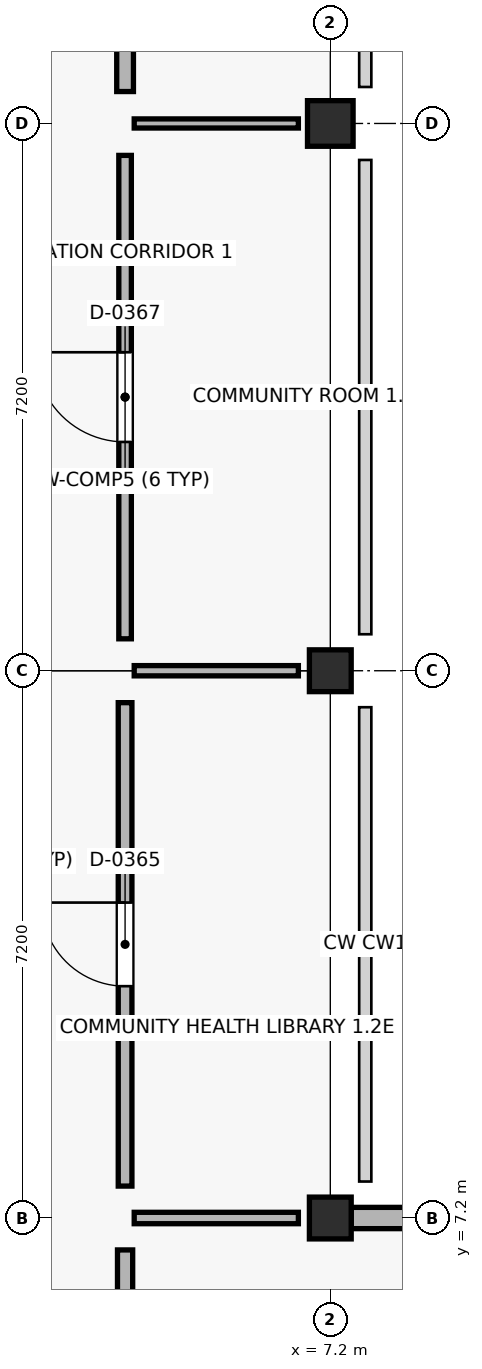
"""IFC4 building model, lengths in metres.
Left out: names, types, materials, properties, quantities, classifications, styles, units other than length and angle.
Written with IfcOpenShell. Run it as: python <this file> out.ifc"""

import sys

from ifc_helpers import new_model, si_unit, direction, frame, frame_2d, origin, origin_2d, place, context, subcontext, project, spatial, rectangle, extrude, element, fill, save


model = new_model("IFC4")
c1 = context("Model", 3, precision=1e-05, world=origin(), true_north=direction((0.0, 1.0)))
c2 = subcontext(c1, "Body", "Model", "MODEL_VIEW")
j1 = project(units=[si_unit("LENGTHUNIT", "METRE"), si_unit("PLANEANGLEUNIT", "RADIAN")], contexts=[c1])
p1 = place(None, origin())
s1 = spatial("IfcSite", under=j1, at=p1, CompositionType="ELEMENT")
p2 = place(p1, origin())
s2 = spatial("IfcBuilding", under=s1, at=p2, CompositionType="ELEMENT")
p3 = place(p2, frame((0.0, 0.0, 4.5)))
s3 = spatial("IfcBuildingStorey", under=s2, at=p3, CompositionType="ELEMENT", Elevation=4.5)
for number, where, z_axis, x_axis in (
    (1, (7.2, 7.2, 0.0), (0.0, 0.0, 1.0), (1.0, 0.0, 0.0)),
    (2, (7.2, 14.4, 0.0), (0.0, 0.0, 1.0), (1.0, 0.0, 0.0)),
):
    element("IfcColumn", number, at=place(p3, frame(where, z_axis=z_axis, x_axis=x_axis)), inside=s3, PredefinedType="COLUMN", context=c2, shape_type="SweptSolid", body=[
        extrude(rectangle(XDim=0.55, YDim=0.55, at=origin_2d()), origin(), (0.0, 0.0, 1.0), 4.5),
    ])
p4 = place(p3, frame((7.2, 21.6, 0.0), z_axis=(0.0, 0.0, 1.0), x_axis=(1.0, 0.0, 0.0)))
e3 = element("IfcColumn", 3, at=p4, inside=s3, PredefinedType="COLUMN", context=c2, shape_type="SweptSolid", body=[
    extrude(rectangle(XDim=0.6, YDim=0.6, at=origin_2d()), origin(), (0.0, 0.0, 1.0), 4.5),
])
p5 = place(p3, frame((14.175, 7.2, 0.0), z_axis=(0.0, 0.0, 1.0), x_axis=(-1.0, 0.0, 0.0)))
e4 = element("IfcWall", 4, at=p5, inside=s3, PredefinedType="STANDARD", context=c2, shape_type="SweptSolid", body=[
    extrude(rectangle(XDim=6.7, YDim=0.28, at=frame_2d((3.35, 0.0))), origin(), (0.0, 0.0, 1.0), 3.47),
])
p6 = place(p5, frame((0.775, 0.0, 0.9)))
e5 = element("IfcOpeningElement", 5, at=p6, cuts=e4, PredefinedType="OPENING", context=c2, shape_type="SweptSolid", body=[
    extrude(rectangle(XDim=1.95, YDim=1.38, at=frame_2d((0.975, 0.69))), frame((0.0, 0.15, 0.0), z_axis=(0.0, -1.0, 0.0), x_axis=(1.0, 0.0, 0.0)), (0.0, 0.0, 1.0), 0.3),
])
p7 = place(p5, frame((3.975, 0.0, 0.9)))
e6 = element("IfcOpeningElement", 6, at=p7, cuts=e4, PredefinedType="OPENING", context=c2, shape_type="SweptSolid", body=[
    extrude(rectangle(XDim=1.95, YDim=1.38, at=frame_2d((0.975, 0.69))), frame((0.0, 0.15, 0.0), z_axis=(0.0, -1.0, 0.0), x_axis=(1.0, 0.0, 0.0)), (0.0, 0.0, 1.0), 0.3),
])
p8 = place(p3, frame((4.5, 0.42, 0.0), z_axis=(0.0, 0.0, 1.0), x_axis=(0.0, 1.0, 0.0)))
e7 = element("IfcWall", 7, at=p8, inside=s3, PredefinedType="SOLIDWALL", context=c2, shape_type="SweptSolid", body=[
    extrude(rectangle(XDim=6.36, YDim=0.2, at=frame_2d((3.18, 0.0))), origin(), (0.0, 0.0, 1.0), 3.36),
])
p9 = place(p8, frame((2.67, 0.0, 0.0)))
e8 = element("IfcOpeningElement", 8, at=p9, cuts=e7, PredefinedType="OPENING", context=c2, shape_type="SweptSolid", body=[
    extrude(rectangle(XDim=1.02, YDim=2.04, at=frame_2d((0.51, 1.02))), frame((0.0, 0.11, 0.0), z_axis=(0.0, -1.0, 0.0), x_axis=(1.0, 0.0, 0.0)), (0.0, 0.0, 1.0), 0.22),
])
p10 = place(p3, frame((4.62, 7.2, 0.0), z_axis=(0.0, 0.0, 1.0), x_axis=(1.0, 0.0, 0.0)))
e9 = element("IfcWall", 9, at=p10, inside=s3, PredefinedType="PARTITIONING", context=c2, shape_type="SweptSolid", body=[
    extrude(rectangle(XDim=2.16, YDim=0.15, at=frame_2d((1.08, 0.0))), origin(), (0.0, 0.0, 1.0), 3.36),
])
p11 = place(p3, frame((4.5, 7.62, 0.0), z_axis=(0.0, 0.0, 1.0), x_axis=(0.0, 1.0, 0.0)))
e10 = element("IfcWall", 10, at=p11, inside=s3, PredefinedType="PARTITIONING", context=c2, shape_type="SweptSolid", body=[
    extrude(rectangle(XDim=6.36, YDim=0.18, at=frame_2d((3.18, 0.0))), origin(), (0.0, 0.0, 1.0), 3.36),
])
p12 = place(p11, frame((2.63, 0.0, 0.0)))
e11 = element("IfcOpeningElement", 11, at=p12, cuts=e10, PredefinedType="OPENING", context=c2, shape_type="SweptSolid", body=[
    extrude(rectangle(XDim=1.1, YDim=2.04, at=frame_2d((0.55, 1.02))), frame((0.0, 0.1, 0.0), z_axis=(0.0, -1.0, 0.0), x_axis=(1.0, 0.0, 0.0)), (0.0, 0.0, 1.0), 0.2),
])
p13 = place(p3, frame((4.62, 14.4, 0.0), z_axis=(0.0, 0.0, 1.0), x_axis=(1.0, 0.0, 0.0)))
e12 = element("IfcWall", 12, at=p13, inside=s3, PredefinedType="PARTITIONING", context=c2, shape_type="SweptSolid", body=[
    extrude(rectangle(XDim=2.16, YDim=0.135, at=frame_2d((1.08, 0.0))), origin(), (0.0, 0.0, 1.0), 3.36),
])
p14 = place(p3, frame((4.5, 14.82, 0.0), z_axis=(0.0, 0.0, 1.0), x_axis=(0.0, 1.0, 0.0)))
e13 = element("IfcWall", 13, at=p14, inside=s3, PredefinedType="PARTITIONING", context=c2, shape_type="SweptSolid", body=[
    extrude(rectangle(XDim=6.36, YDim=0.165, at=frame_2d((3.18, 0.0))), origin(), (0.0, 0.0, 1.0), 3.36),
])
p15 = place(p14, frame((2.59, 0.0, 0.0)))
e14 = element("IfcOpeningElement", 14, at=p15, cuts=e13, PredefinedType="OPENING", context=c2, shape_type="SweptSolid", body=[
    extrude(rectangle(XDim=1.18, YDim=2.04, at=frame_2d((0.59, 1.02))), frame((0.0, 0.093, 0.0), z_axis=(0.0, -1.0, 0.0), x_axis=(1.0, 0.0, 0.0)), (0.0, 0.0, 1.0), 0.185),
])
p16 = place(p3, frame((4.62, 21.6, 0.0), z_axis=(0.0, 0.0, 1.0), x_axis=(1.0, 0.0, 0.0)))
e15 = element("IfcWall", 15, at=p16, inside=s3, PredefinedType="PARTITIONING", context=c2, shape_type="SweptSolid", body=[
    extrude(rectangle(XDim=2.16, YDim=0.12, at=frame_2d((1.08, 0.0))), origin(), (0.0, 0.0, 1.0), 3.36),
])
p17 = place(p3, frame((4.5, 22.02, 0.0), z_axis=(0.0, 0.0, 1.0), x_axis=(0.0, 1.0, 0.0)))
e16 = element("IfcWall", 16, at=p17, inside=s3, PredefinedType="SOLIDWALL", context=c2, shape_type="SweptSolid", body=[
    extrude(rectangle(XDim=5.13, YDim=0.22, at=frame_2d((2.565, 0.0))), origin(), (0.0, 0.0, 1.0), 3.36),
])
p18 = place(p17, frame((1.935, 0.0, 0.0)))
e17 = element("IfcOpeningElement", 17, at=p18, cuts=e16, PredefinedType="OPENING", context=c2, shape_type="SweptSolid", body=[
    extrude(rectangle(XDim=1.26, YDim=2.04, at=frame_2d((0.63, 1.02))), frame((0.0, 0.12, 0.0), z_axis=(0.0, -1.0, 0.0), x_axis=(1.0, 0.0, 0.0)), (0.0, 0.0, 1.0), 0.24),
])
p19 = place(p12, origin())
e18 = element("IfcDoor", 18, at=p19, inside=s3, OperationType="SINGLE_SWING_RIGHT", PredefinedType="DOOR", context=c2, shape_type="SweptSolid", body=[
    extrude(rectangle(XDim=1.1, YDim=2.04, at=frame_2d((0.55, 1.02))), frame((0.0, 0.025, 0.0), z_axis=(0.0, -1.0, 0.0), x_axis=(1.0, 0.0, 0.0)), (0.0, 0.0, 1.0), 0.05),
])
fill(e11, e18)
p20 = place(p15, origin())
e19 = element("IfcDoor", 19, at=p20, inside=s3, OperationType="SINGLE_SWING_RIGHT", PredefinedType="DOOR", context=c2, shape_type="SweptSolid", body=[
    extrude(rectangle(XDim=1.18, YDim=2.04, at=frame_2d((0.59, 1.02))), frame((0.0, 0.025, 0.0), z_axis=(0.0, -1.0, 0.0), x_axis=(1.0, 0.0, 0.0)), (0.0, 0.0, 1.0), 0.05),
])
fill(e14, e19)
save(model, sys.argv[1])
